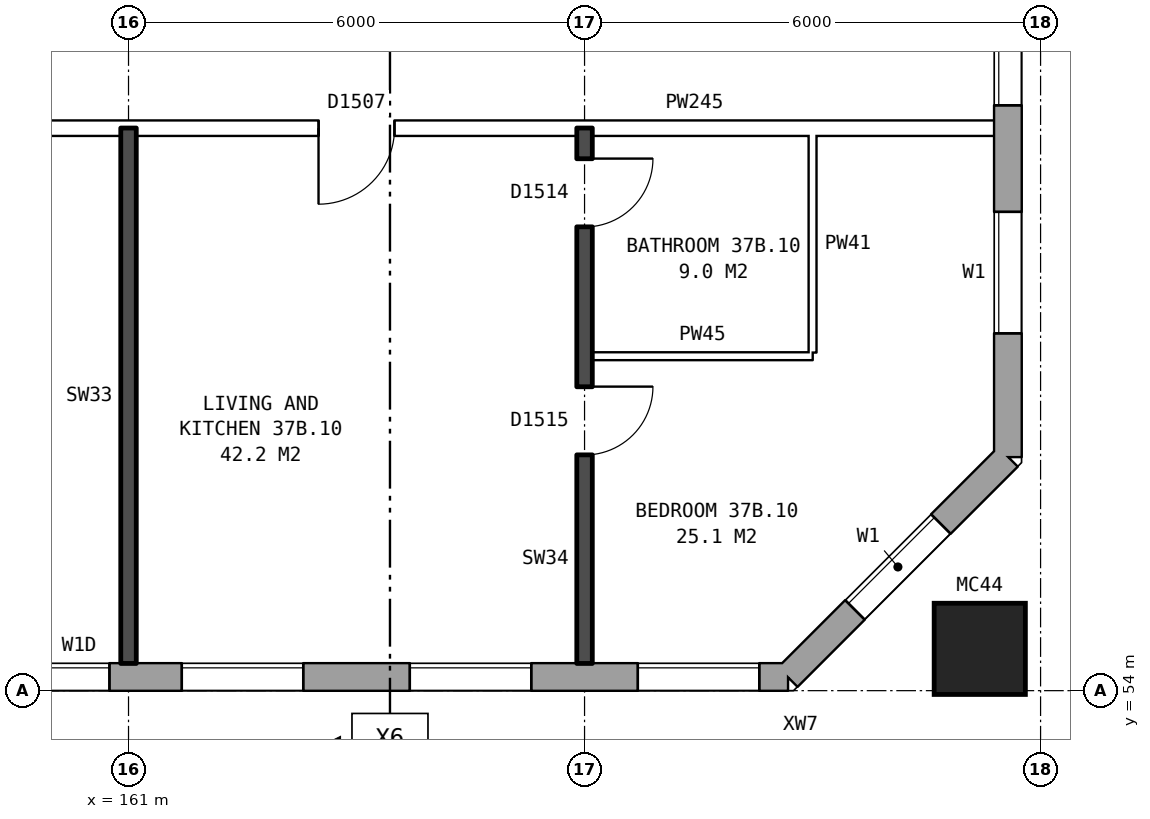
"""IFC4 building model, lengths in metres.
Left out: names, types, materials, properties, quantities, classifications, styles, units other than length and angle.
Written with IfcOpenShell. Run it as: python <this file> out.ifc"""

import sys

from ifc_helpers import new_model, si_unit, direction, frame, frame_2d, origin, origin_2d, place, context, subcontext, project, spatial, rectangle, hollow_rectangle, extrude, element, fill, save


model = new_model("IFC4")
c1 = context("Model", 3, precision=1e-05, world=origin(), true_north=direction((0.0, 1.0)))
c2 = subcontext(c1, "Body", "Model", "MODEL_VIEW")
j1 = project(units=[si_unit("LENGTHUNIT", "METRE"), si_unit("PLANEANGLEUNIT", "RADIAN")], contexts=[c1])
p1 = place(None, origin())
s1 = spatial("IfcSite", under=j1, at=p1, CompositionType="ELEMENT")
p2 = place(p1, origin())
s2 = spatial("IfcBuilding", under=s1, at=p2, CompositionType="ELEMENT")
p3 = place(p2, frame((0.0, 0.0, 133.0)))
s3 = spatial("IfcBuildingStorey", under=s2, at=p3, CompositionType="ELEMENT", Elevation=133.0)
p4 = place(p3, frame((172.2, 54.55, 0.0), z_axis=(0.0, 0.0, 1.0), x_axis=(1.0, 0.0, 0.0)))
e1 = element("IfcColumn", 1, at=p4, inside=s3, PredefinedType="COLUMN", context=c2, shape_type="SweptSolid", body=[
    extrude(hollow_rectangle(XDim=1.2, YDim=1.2, WallThickness=0.065, at=origin_2d()), origin(), (0.0, 0.0, 1.0), 3.1),
])
p5 = place(p3, frame((134.075, 54.18, 0.0), z_axis=(0.0, 0.0, 1.0), x_axis=(1.0, 0.0, 0.0)))
e2 = element("IfcWall", 2, at=p5, inside=s3, PredefinedType="STANDARD", context=c2, shape_type="SweptSolid", body=[
    extrude(rectangle(XDim=35.601, YDim=0.36, at=frame_2d((17.8, 0.0))), origin(), (0.0, 0.0, 1.0), 2.85),
])
p6 = place(p5, frame((0.625, 0.0, 0.8)))
e3 = element("IfcOpeningElement", 3, at=p6, cuts=e2, PredefinedType="OPENING", context=c2, shape_type="SweptSolid", body=[
    extrude(rectangle(XDim=1.6, YDim=1.8, at=frame_2d((0.8, 0.9))), frame((0.0, 0.19, 0.0), z_axis=(0.0, -1.0, 0.0), x_axis=(1.0, 0.0, 0.0)), (0.0, 0.0, 1.0), 0.38),
])
p7 = place(p5, frame((3.625, 0.0, 0.8)))
e4 = element("IfcOpeningElement", 4, at=p7, cuts=e2, PredefinedType="OPENING", context=c2, shape_type="SweptSolid", body=[
    extrude(rectangle(XDim=1.6, YDim=1.8, at=frame_2d((0.8, 0.9))), frame((0.0, 0.19, 0.0), z_axis=(0.0, -1.0, 0.0), x_axis=(1.0, 0.0, 0.0)), (0.0, 0.0, 1.0), 0.38),
])
p8 = place(p5, frame((6.625, 0.0, 0.8)))
e5 = element("IfcOpeningElement", 5, at=p8, cuts=e2, PredefinedType="OPENING", context=c2, shape_type="SweptSolid", body=[
    extrude(rectangle(XDim=1.6, YDim=1.8, at=frame_2d((0.8, 0.9))), frame((0.0, 0.19, 0.0), z_axis=(0.0, -1.0, 0.0), x_axis=(1.0, 0.0, 0.0)), (0.0, 0.0, 1.0), 0.38),
])
p9 = place(p5, frame((9.125, 0.0, 1.35)))
e6 = element("IfcOpeningElement", 6, at=p9, cuts=e2, PredefinedType="OPENING", context=c2, shape_type="SweptSolid", body=[
    extrude(rectangle(XDim=1.2, YDim=1.2, at=frame_2d((0.6, 0.6))), frame((0.0, 0.19, 0.0), z_axis=(0.0, -1.0, 0.0), x_axis=(1.0, 0.0, 0.0)), (0.0, 0.0, 1.0), 0.38),
])
p10 = place(p5, frame((12.625, 0.0, 0.8)))
e7 = element("IfcOpeningElement", 7, at=p10, cuts=e2, PredefinedType="OPENING", context=c2, shape_type="SweptSolid", body=[
    extrude(rectangle(XDim=1.6, YDim=1.8, at=frame_2d((0.8, 0.9))), frame((0.0, 0.19, 0.0), z_axis=(0.0, -1.0, 0.0), x_axis=(1.0, 0.0, 0.0)), (0.0, 0.0, 1.0), 0.38),
])
p11 = place(p5, frame((15.625, 0.0, 0.8)))
e8 = element("IfcOpeningElement", 8, at=p11, cuts=e2, PredefinedType="OPENING", context=c2, shape_type="SweptSolid", body=[
    extrude(rectangle(XDim=1.6, YDim=1.8, at=frame_2d((0.8, 0.9))), frame((0.0, 0.19, 0.0), z_axis=(0.0, -1.0, 0.0), x_axis=(1.0, 0.0, 0.0)), (0.0, 0.0, 1.0), 0.38),
])
p12 = place(p5, frame((18.625, 0.0, 0.8)))
e9 = element("IfcOpeningElement", 9, at=p12, cuts=e2, PredefinedType="OPENING", context=c2, shape_type="SweptSolid", body=[
    extrude(rectangle(XDim=1.6, YDim=1.8, at=frame_2d((0.8, 0.9))), frame((0.0, 0.19, 0.0), z_axis=(0.0, -1.0, 0.0), x_axis=(1.0, 0.0, 0.0)), (0.0, 0.0, 1.0), 0.38),
])
p13 = place(p5, frame((21.625, 0.0, 0.8)))
e10 = element("IfcOpeningElement", 10, at=p13, cuts=e2, PredefinedType="OPENING", context=c2, shape_type="SweptSolid", body=[
    extrude(rectangle(XDim=1.6, YDim=1.8, at=frame_2d((0.8, 0.9))), frame((0.0, 0.19, 0.0), z_axis=(0.0, -1.0, 0.0), x_axis=(1.0, 0.0, 0.0)), (0.0, 0.0, 1.0), 0.38),
])
p14 = place(p5, frame((24.975, 0.0, 1.7)))
e11 = element("IfcOpeningElement", 11, at=p14, cuts=e2, PredefinedType="OPENING", context=c2, shape_type="SweptSolid", body=[
    extrude(rectangle(XDim=0.6, YDim=0.9, at=frame_2d((0.3, 0.45))), frame((0.0, 0.19, 0.0), z_axis=(0.0, -1.0, 0.0), x_axis=(1.0, 0.0, 0.0)), (0.0, 0.0, 1.0), 0.38),
])
p15 = place(p5, frame((27.625, 0.0, 0.8)))
e12 = element("IfcOpeningElement", 12, at=p15, cuts=e2, PredefinedType="OPENING", context=c2, shape_type="SweptSolid", body=[
    extrude(rectangle(XDim=1.6, YDim=1.8, at=frame_2d((0.8, 0.9))), frame((0.0, 0.19, 0.0), z_axis=(0.0, -1.0, 0.0), x_axis=(1.0, 0.0, 0.0)), (0.0, 0.0, 1.0), 0.38),
])
p16 = place(p5, frame((30.625, 0.0, 0.8)))
e13 = element("IfcOpeningElement", 13, at=p16, cuts=e2, PredefinedType="OPENING", context=c2, shape_type="SweptSolid", body=[
    extrude(rectangle(XDim=1.6, YDim=1.8, at=frame_2d((0.8, 0.9))), frame((0.0, 0.19, 0.0), z_axis=(0.0, -1.0, 0.0), x_axis=(1.0, 0.0, 0.0)), (0.0, 0.0, 1.0), 0.38),
])
p17 = place(p5, frame((33.625, 0.0, 0.8)))
e14 = element("IfcOpeningElement", 14, at=p17, cuts=e2, PredefinedType="OPENING", context=c2, shape_type="SweptSolid", body=[
    extrude(rectangle(XDim=1.6, YDim=1.8, at=frame_2d((0.8, 0.9))), frame((0.0, 0.19, 0.0), z_axis=(0.0, -1.0, 0.0), x_axis=(1.0, 0.0, 0.0)), (0.0, 0.0, 1.0), 0.38),
])
p18 = place(p5, frame((11.125, 0.0, 0.15)))
e15 = element("IfcOpeningElement", 15, at=p18, cuts=e2, PredefinedType="OPENING", context=c2, shape_type="SweptSolid", body=[
    extrude(rectangle(XDim=0.6, YDim=0.9, at=frame_2d((0.3, 0.45))), frame((0.0, 0.19, 0.0), z_axis=(0.0, -1.0, 0.0), x_axis=(1.0, 0.0, 0.0)), (0.0, 0.0, 1.0), 0.38),
])
p19 = place(p5, frame((25.875, 0.0, 0.8)))
e16 = element("IfcOpeningElement", 16, at=p19, cuts=e2, PredefinedType="OPENING", context=c2, shape_type="SweptSolid", body=[
    extrude(rectangle(XDim=0.8, YDim=1.8, at=frame_2d((0.4, 0.9))), frame((0.0, 0.19, 0.0), z_axis=(0.0, -1.0, 0.0), x_axis=(1.0, 0.0, 0.0)), (0.0, 0.0, 1.0), 0.38),
])
p20 = place(p3, frame((169.675, 54.18, 0.0), z_axis=(0.0, 0.0, 1.0), x_axis=(0.707106781187, 0.707106781187, 0.0)))
e17 = element("IfcWall", 17, at=p20, inside=s3, PredefinedType="STANDARD", context=c2, shape_type="SweptSolid", body=[
    extrude(rectangle(XDim=4.094, YDim=0.36, at=frame_2d((2.047, 0.0))), origin(), (0.0, 0.0, 1.0), 2.85),
])
p21 = place(p20, frame((1.247, 0.0, 0.8)))
e18 = element("IfcOpeningElement", 18, at=p21, cuts=e17, PredefinedType="OPENING", context=c2, shape_type="SweptSolid", body=[
    extrude(rectangle(XDim=1.6, YDim=1.8, at=frame_2d((0.8, 0.9))), frame((0.0, 0.19, 0.0), z_axis=(0.0, -1.0, 0.0), x_axis=(1.0, 0.0, 0.0)), (0.0, 0.0, 1.0), 0.38),
])
p22 = place(p3, frame((172.57, 57.075, 0.0), z_axis=(0.0, 0.0, 1.0), x_axis=(0.0, 1.0, 0.0)))
e19 = element("IfcWall", 19, at=p22, inside=s3, PredefinedType="STANDARD", context=c2, shape_type="SweptSolid", body=[
    extrude(rectangle(XDim=25.851, YDim=0.36, at=frame_2d((12.925, 0.0))), origin(), (0.0, 0.0, 1.0), 2.85),
])
p23 = place(p22, frame((1.625, 0.0, 0.8)))
e20 = element("IfcOpeningElement", 20, at=p23, cuts=e19, PredefinedType="OPENING", context=c2, shape_type="SweptSolid", body=[
    extrude(rectangle(XDim=1.6, YDim=1.8, at=frame_2d((0.8, 0.9))), frame((0.0, 0.19, 0.0), z_axis=(0.0, -1.0, 0.0), x_axis=(1.0, 0.0, 0.0)), (0.0, 0.0, 1.0), 0.38),
])
p24 = place(p22, frame((4.625, 0.0, 0.8)))
e21 = element("IfcOpeningElement", 21, at=p24, cuts=e19, PredefinedType="OPENING", context=c2, shape_type="SweptSolid", body=[
    extrude(rectangle(XDim=1.6, YDim=1.8, at=frame_2d((0.8, 0.9))), frame((0.0, 0.19, 0.0), z_axis=(0.0, -1.0, 0.0), x_axis=(1.0, 0.0, 0.0)), (0.0, 0.0, 1.0), 0.38),
])
p25 = place(p22, frame((8.025, 0.0, 1.7)))
e22 = element("IfcOpeningElement", 22, at=p25, cuts=e19, PredefinedType="OPENING", context=c2, shape_type="SweptSolid", body=[
    extrude(rectangle(XDim=1.0, YDim=0.9, at=frame_2d((0.5, 0.45))), frame((0.0, 0.19, 0.0), z_axis=(0.0, -1.0, 0.0), x_axis=(1.0, 0.0, 0.0)), (0.0, 0.0, 1.0), 0.38),
])
p26 = place(p22, frame((10.625, 0.0, 0.8)))
e23 = element("IfcOpeningElement", 23, at=p26, cuts=e19, PredefinedType="OPENING", context=c2, shape_type="SweptSolid", body=[
    extrude(rectangle(XDim=1.6, YDim=1.8, at=frame_2d((0.8, 0.9))), frame((0.0, 0.19, 0.0), z_axis=(0.0, -1.0, 0.0), x_axis=(1.0, 0.0, 0.0)), (0.0, 0.0, 1.0), 0.38),
])
p27 = place(p22, frame((13.625, 0.0, 0.8)))
e24 = element("IfcOpeningElement", 24, at=p27, cuts=e19, PredefinedType="OPENING", context=c2, shape_type="SweptSolid", body=[
    extrude(rectangle(XDim=1.6, YDim=1.8, at=frame_2d((0.8, 0.9))), frame((0.0, 0.19, 0.0), z_axis=(0.0, -1.0, 0.0), x_axis=(1.0, 0.0, 0.0)), (0.0, 0.0, 1.0), 0.38),
])
p28 = place(p22, frame((9.325, 0.0, 0.8)))
e25 = element("IfcOpeningElement", 25, at=p28, cuts=e19, PredefinedType="OPENING", context=c2, shape_type="SweptSolid", body=[
    extrude(rectangle(XDim=1.0, YDim=1.8, at=frame_2d((0.5, 0.9))), frame((0.0, 0.19, 0.0), z_axis=(0.0, -1.0, 0.0), x_axis=(1.0, 0.0, 0.0)), (0.0, 0.0, 1.0), 0.38),
])
p29 = place(p22, frame((19.625, 0.0, 0.8)))
e26 = element("IfcOpeningElement", 26, at=p29, cuts=e19, PredefinedType="OPENING", context=c2, shape_type="SweptSolid", body=[
    extrude(rectangle(XDim=1.6, YDim=1.8, at=frame_2d((0.8, 0.9))), frame((0.0, 0.19, 0.0), z_axis=(0.0, -1.0, 0.0), x_axis=(1.0, 0.0, 0.0)), (0.0, 0.0, 1.0), 0.38),
])
p30 = place(p22, frame((22.625, 0.0, 0.8)))
e27 = element("IfcOpeningElement", 27, at=p30, cuts=e19, PredefinedType="OPENING", context=c2, shape_type="SweptSolid", body=[
    extrude(rectangle(XDim=1.6, YDim=1.8, at=frame_2d((0.8, 0.9))), frame((0.0, 0.19, 0.0), z_axis=(0.0, -1.0, 0.0), x_axis=(1.0, 0.0, 0.0)), (0.0, 0.0, 1.0), 0.38),
])
p31 = place(p22, frame((12.525, 0.0, 0.8)))
e28 = element("IfcOpeningElement", 28, at=p31, cuts=e19, PredefinedType="OPENING", context=c2, shape_type="SweptSolid", body=[
    extrude(rectangle(XDim=0.8, YDim=1.8, at=frame_2d((0.4, 0.9))), frame((0.0, 0.19, 0.0), z_axis=(0.0, -1.0, 0.0), x_axis=(1.0, 0.0, 0.0)), (0.0, 0.0, 1.0), 0.38),
])
p32 = place(p22, frame((15.525, 0.0, 0.8)))
e29 = element("IfcOpeningElement", 29, at=p32, cuts=e19, PredefinedType="OPENING", context=c2, shape_type="SweptSolid", body=[
    extrude(rectangle(XDim=1.0, YDim=1.8, at=frame_2d((0.5, 0.9))), frame((0.0, 0.19, 0.0), z_axis=(0.0, -1.0, 0.0), x_axis=(1.0, 0.0, 0.0)), (0.0, 0.0, 1.0), 0.38),
])
p33 = place(p22, frame((16.825, 0.0, 1.7)))
e30 = element("IfcOpeningElement", 30, at=p33, cuts=e19, PredefinedType="OPENING", context=c2, shape_type="SweptSolid", body=[
    extrude(rectangle(XDim=1.0, YDim=0.9, at=frame_2d((0.5, 0.45))), frame((0.0, 0.19, 0.0), z_axis=(0.0, -1.0, 0.0), x_axis=(1.0, 0.0, 0.0)), (0.0, 0.0, 1.0), 0.38),
])
p34 = place(p3, frame((167.1, 58.4, 0.0), z_axis=(0.0, 0.0, 1.0), x_axis=(1.0, 0.0, 0.0)))
e31 = element("IfcWall", 31, at=p34, inside=s3, PredefinedType="PARTITIONING", context=c2, shape_type="SweptSolid", body=[
    extrude(rectangle(XDim=2.9, YDim=0.1, at=frame_2d((1.45, 0.0))), origin(), (0.0, 0.0, 1.0), 2.85),
])
p35 = place(p3, frame((155.1, 61.4, 0.0), z_axis=(0.0, 0.0, 1.0), x_axis=(1.0, 0.0, 0.0)))
e32 = element("IfcWall", 32, at=p35, inside=s3, PredefinedType="PARTITIONING", context=c2, shape_type="SweptSolid", body=[
    extrude(rectangle(XDim=17.29, YDim=0.2, at=frame_2d((8.645, 0.0))), origin(), (0.0, 0.0, 1.0), 2.85),
])
p36 = place(p35, frame((3.6, 0.0, 0.0)))
e33 = element("IfcOpeningElement", 33, at=p36, cuts=e32, PredefinedType="OPENING", context=c2, shape_type="SweptSolid", body=[
    extrude(rectangle(XDim=1.0, YDim=2.1, at=frame_2d((0.5, 1.05))), frame((0.0, 0.11, 0.0), z_axis=(0.0, -1.0, 0.0), x_axis=(1.0, 0.0, 0.0)), (0.0, 0.0, 1.0), 0.22),
])
p37 = place(p35, frame((8.4, 0.0, 0.0)))
e34 = element("IfcOpeningElement", 34, at=p37, cuts=e32, PredefinedType="OPENING", context=c2, shape_type="SweptSolid", body=[
    extrude(rectangle(XDim=1.0, YDim=2.1, at=frame_2d((0.5, 1.05))), frame((0.0, 0.11, 0.0), z_axis=(0.0, -1.0, 0.0), x_axis=(1.0, 0.0, 0.0)), (0.0, 0.0, 1.0), 0.22),
])
p38 = place(p3, frame((161.0, 54.36, 0.0), z_axis=(0.0, 0.0, 1.0), x_axis=(0.0, 1.0, 0.0)))
e35 = element("IfcWall", 35, at=p38, inside=s3, PredefinedType="SOLIDWALL", context=c2, shape_type="SweptSolid", body=[
    extrude(rectangle(XDim=7.04, YDim=0.2, at=frame_2d((3.52, 0.0))), origin(), (0.0, 0.0, 1.0), 2.85),
])
p39 = place(p3, frame((167.0, 54.36, 0.0), z_axis=(0.0, 0.0, 1.0), x_axis=(0.0, 1.0, 0.0)))
e36 = element("IfcWall", 36, at=p39, inside=s3, PredefinedType="SOLIDWALL", context=c2, shape_type="SweptSolid", body=[
    extrude(rectangle(XDim=7.04, YDim=0.2, at=frame_2d((3.52, 0.0))), origin(), (0.0, 0.0, 1.0), 2.85),
])
p40 = place(p39, frame((2.74, 0.0, 0.0)))
e37 = element("IfcOpeningElement", 37, at=p40, cuts=e36, PredefinedType="OPENING", context=c2, shape_type="SweptSolid", body=[
    extrude(rectangle(XDim=0.9, YDim=2.1, at=frame_2d((0.45, 1.05))), frame((0.0, 0.11, 0.0), z_axis=(0.0, -1.0, 0.0), x_axis=(1.0, 0.0, 0.0)), (0.0, 0.0, 1.0), 0.22),
])
p41 = place(p39, frame((5.74, 0.0, 0.0)))
e38 = element("IfcOpeningElement", 38, at=p41, cuts=e36, PredefinedType="OPENING", context=c2, shape_type="SweptSolid", body=[
    extrude(rectangle(XDim=0.9, YDim=2.1, at=frame_2d((0.45, 1.05))), frame((0.0, 0.11, 0.0), z_axis=(0.0, -1.0, 0.0), x_axis=(1.0, 0.0, 0.0)), (0.0, 0.0, 1.0), 0.22),
])
p42 = place(p3, frame((170.0, 58.45, 0.0), z_axis=(0.0, 0.0, 1.0), x_axis=(0.0, 1.0, 0.0)))
e39 = element("IfcWall", 39, at=p42, inside=s3, PredefinedType="PARTITIONING", context=c2, shape_type="SweptSolid", body=[
    extrude(rectangle(XDim=2.85, YDim=0.1, at=frame_2d((1.425, 0.0))), origin(), (0.0, 0.0, 1.0), 2.85),
])
p43 = place(p15, origin())
e40 = element("IfcWindow", 40, at=p43, inside=s3, PartitioningType="SINGLE_PANEL", PredefinedType="WINDOW", context=c2, shape_type="SweptSolid", body=[
    extrude(rectangle(XDim=1.6, YDim=1.8, at=frame_2d((0.8, 0.9))), frame((0.0, 0.15, 0.0), z_axis=(0.0, -1.0, 0.0), x_axis=(1.0, 0.0, 0.0)), (0.0, 0.0, 1.0), 0.06),
])
fill(e12, e40)
p44 = place(p16, origin())
e41 = element("IfcWindow", 41, at=p44, inside=s3, PartitioningType="SINGLE_PANEL", PredefinedType="WINDOW", context=c2, shape_type="SweptSolid", body=[
    extrude(rectangle(XDim=1.6, YDim=1.8, at=frame_2d((0.8, 0.9))), frame((0.0, 0.15, 0.0), z_axis=(0.0, -1.0, 0.0), x_axis=(1.0, 0.0, 0.0)), (0.0, 0.0, 1.0), 0.06),
])
fill(e13, e41)
p45 = place(p17, origin())
e42 = element("IfcWindow", 42, at=p45, inside=s3, PartitioningType="SINGLE_PANEL", PredefinedType="WINDOW", context=c2, shape_type="SweptSolid", body=[
    extrude(rectangle(XDim=1.6, YDim=1.8, at=frame_2d((0.8, 0.9))), frame((0.0, 0.15, 0.0), z_axis=(0.0, -1.0, 0.0), x_axis=(1.0, 0.0, 0.0)), (0.0, 0.0, 1.0), 0.06),
])
fill(e14, e42)
p46 = place(p21, origin())
e43 = element("IfcWindow", 43, at=p46, inside=s3, PartitioningType="SINGLE_PANEL", PredefinedType="WINDOW", context=c2, shape_type="SweptSolid", body=[
    extrude(rectangle(XDim=1.6, YDim=1.8, at=frame_2d((0.8, 0.9))), frame((0.0, 0.15, 0.0), z_axis=(0.0, -1.0, 0.0), x_axis=(1.0, 0.0, 0.0)), (0.0, 0.0, 1.0), 0.06),
])
fill(e18, e43)
p47 = place(p23, origin())
e44 = element("IfcWindow", 44, at=p47, inside=s3, PartitioningType="SINGLE_PANEL", PredefinedType="WINDOW", context=c2, shape_type="SweptSolid", body=[
    extrude(rectangle(XDim=1.6, YDim=1.8, at=frame_2d((0.8, 0.9))), frame((0.0, 0.15, 0.0), z_axis=(0.0, -1.0, 0.0), x_axis=(1.0, 0.0, 0.0)), (0.0, 0.0, 1.0), 0.06),
])
fill(e20, e44)
p48 = place(p24, origin())
e45 = element("IfcWindow", 45, at=p48, inside=s3, PartitioningType="SINGLE_PANEL", PredefinedType="WINDOW", context=c2, shape_type="SweptSolid", body=[
    extrude(rectangle(XDim=1.6, YDim=1.8, at=frame_2d((0.8, 0.9))), frame((0.0, 0.15, 0.0), z_axis=(0.0, -1.0, 0.0), x_axis=(1.0, 0.0, 0.0)), (0.0, 0.0, 1.0), 0.06),
])
fill(e21, e45)
p49 = place(p40, frame((0.9, 0.0, 0.0), z_axis=(0.0, 0.0, 1.0), x_axis=(-1.0, 0.0, 0.0)))
e46 = element("IfcDoor", 46, at=p49, inside=s3, OperationType="SINGLE_SWING_LEFT", PredefinedType="DOOR", context=c2, shape_type="SweptSolid", body=[
    extrude(rectangle(XDim=0.9, YDim=2.1, at=frame_2d((0.45, 1.05))), frame((0.0, 0.025, 0.0), z_axis=(0.0, -1.0, 0.0), x_axis=(1.0, 0.0, 0.0)), (0.0, 0.0, 1.0), 0.05),
])
fill(e37, e46)
p50 = place(p37, frame((1.0, 0.0, 0.0), z_axis=(0.0, 0.0, 1.0), x_axis=(-1.0, 0.0, 0.0)))
e47 = element("IfcDoor", 47, at=p50, inside=s3, OperationType="SINGLE_SWING_RIGHT", PredefinedType="DOOR", context=c2, shape_type="SweptSolid", body=[
    extrude(rectangle(XDim=1.0, YDim=2.1, at=frame_2d((0.5, 1.05))), frame((0.0, 0.025, 0.0), z_axis=(0.0, -1.0, 0.0), x_axis=(1.0, 0.0, 0.0)), (0.0, 0.0, 1.0), 0.05),
])
fill(e34, e47)
p51 = place(p41, frame((0.9, 0.0, 0.0), z_axis=(0.0, 0.0, 1.0), x_axis=(-1.0, 0.0, 0.0)))
e48 = element("IfcDoor", 48, at=p51, inside=s3, OperationType="SINGLE_SWING_LEFT", PredefinedType="DOOR", context=c2, shape_type="SweptSolid", body=[
    extrude(rectangle(XDim=0.9, YDim=2.1, at=frame_2d((0.45, 1.05))), frame((0.0, 0.025, 0.0), z_axis=(0.0, -1.0, 0.0), x_axis=(1.0, 0.0, 0.0)), (0.0, 0.0, 1.0), 0.05),
])
fill(e38, e48)
p52 = place(p19, origin())
e49 = element("IfcWindow", 49, at=p52, inside=s3, PartitioningType="SINGLE_PANEL", PredefinedType="WINDOW", context=c2, shape_type="SweptSolid", body=[
    extrude(rectangle(XDim=0.8, YDim=1.8, at=frame_2d((0.4, 0.9))), frame((0.0, 0.15, 0.0), z_axis=(0.0, -1.0, 0.0), x_axis=(1.0, 0.0, 0.0)), (0.0, 0.0, 1.0), 0.06),
])
fill(e16, e49)
save(model, sys.argv[1])
